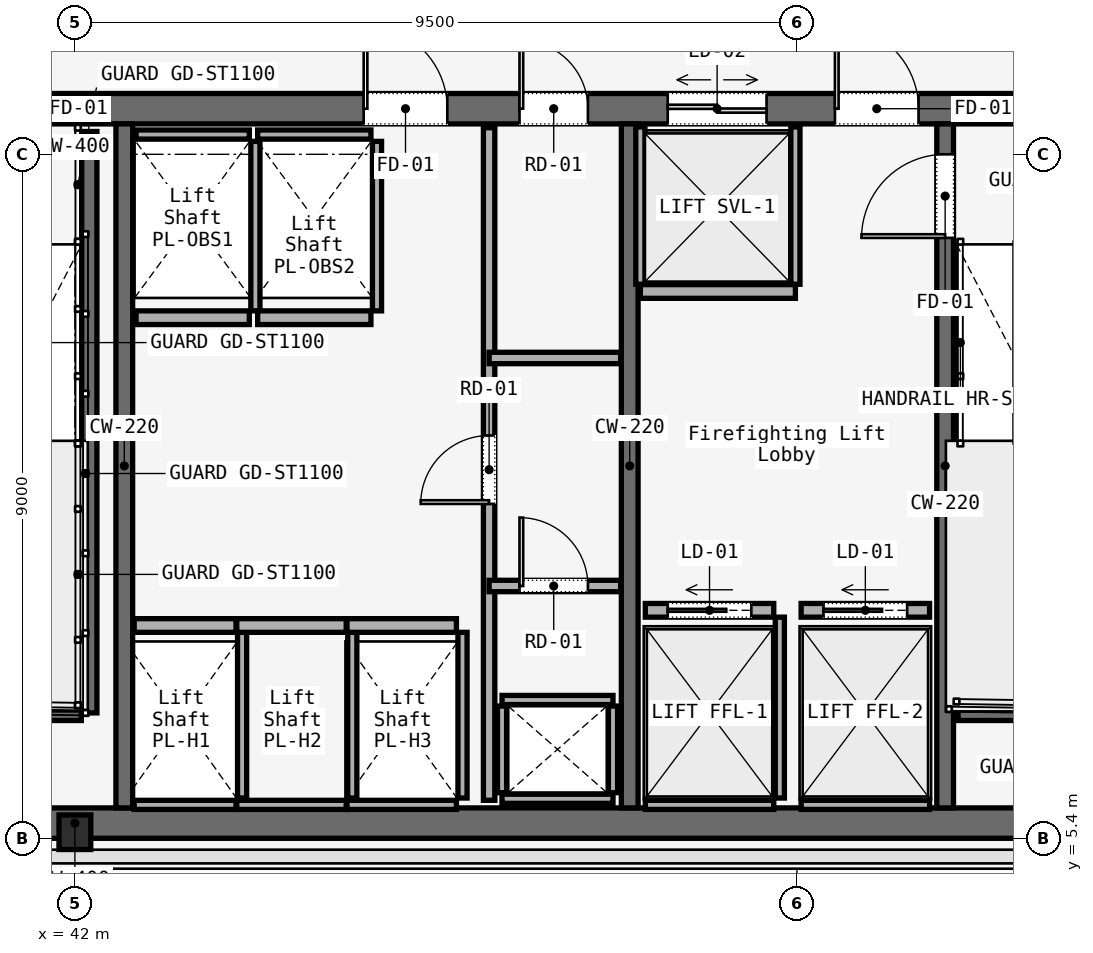
"""IFC4 building model, lengths in metres.
Left out: names, types, materials, properties, quantities, classifications, styles, units other than length and angle.
Written with IfcOpenShell. Run it as: python <this file> out.ifc"""

import sys

from ifc_helpers import new_model, si_unit, direction, frame, frame_2d, origin, origin_2d, place, context, subcontext, project, spatial, rectangle, i_section, extrude, element, fill, save


model = new_model("IFC4")
c1 = context("Model", 3, precision=1e-05, world=origin(), true_north=direction((0.0, 1.0)))
c2 = subcontext(c1, "Body", "Model", "MODEL_VIEW")
j1 = project(units=[si_unit("LENGTHUNIT", "METRE"), si_unit("PLANEANGLEUNIT", "RADIAN")], contexts=[c1])
p1 = place(None, origin())
s1 = spatial("IfcSite", under=j1, at=p1, CompositionType="ELEMENT")
p2 = place(p1, origin())
s2 = spatial("IfcBuilding", under=s1, at=p2, CompositionType="ELEMENT")
p3 = place(p2, frame((0.0, 0.0, 165.0)))
s3 = spatial("IfcBuildingStorey", under=s2, at=p3, CompositionType="ELEMENT", Elevation=165.0)
p4 = place(p3, frame((26.45, 15.0, 0.0), z_axis=(0.0, 0.0, 1.0), x_axis=(1.0, 0.0, 0.0)))
e1 = element("IfcWall", 1, at=p4, inside=s3, PredefinedType="SOLIDWALL", context=c2, shape_type="SweptSolid", body=[
    extrude(rectangle(XDim=31.1, YDim=0.4, at=frame_2d((15.55, 0.0))), origin(), (0.0, 0.0, 1.0), 3.58),
])
p5 = place(p4, frame((1.65, 0.0, 0.0)))
e2 = element("IfcOpeningElement", 2, at=p5, cuts=e1, PredefinedType="OPENING", context=c2, shape_type="SweptSolid", body=[
    extrude(rectangle(XDim=1.1, YDim=2.2, at=frame_2d((0.55, 1.1))), frame((0.0, 0.2, 0.0), z_axis=(0.0, -1.0, 0.0), x_axis=(1.0, 0.0, 0.0)), (0.0, 0.0, 1.0), 0.4),
])
p6 = place(p4, frame((13.65, 0.0, 0.0)))
e3 = element("IfcOpeningElement", 3, at=p6, cuts=e1, PredefinedType="OPENING", context=c2, shape_type="SweptSolid", body=[
    extrude(rectangle(XDim=1.1, YDim=2.2, at=frame_2d((0.55, 1.1))), frame((0.0, 0.2, 0.0), z_axis=(0.0, -1.0, 0.0), x_axis=(1.0, 0.0, 0.0)), (0.0, 0.0, 1.0), 0.4),
])
p7 = place(p4, frame((25.55, 0.0, 0.0)))
e4 = element("IfcOpeningElement", 4, at=p7, cuts=e1, PredefinedType="OPENING", context=c2, shape_type="SweptSolid", body=[
    extrude(rectangle(XDim=1.1, YDim=2.2, at=frame_2d((0.55, 1.1))), frame((0.0, 0.2, 0.0), z_axis=(0.0, -1.0, 0.0), x_axis=(1.0, 0.0, 0.0)), (0.0, 0.0, 1.0), 0.4),
])
p8 = place(p4, frame((10.7, 0.0, 0.0)))
e5 = element("IfcOpeningElement", 5, at=p8, cuts=e1, PredefinedType="OPENING", context=c2, shape_type="SweptSolid", body=[
    extrude(rectangle(XDim=1.4, YDim=2.2, at=frame_2d((0.7, 1.1))), frame((0.0, 0.2, 0.0), z_axis=(0.0, -1.0, 0.0), x_axis=(1.0, 0.0, 0.0)), (0.0, 0.0, 1.0), 0.4),
])
p9 = place(p4, frame((19.35, 0.0, 0.0)))
e6 = element("IfcOpeningElement", 6, at=p9, cuts=e1, PredefinedType="OPENING", context=c2, shape_type="SweptSolid", body=[
    extrude(rectangle(XDim=1.1, YDim=2.2, at=frame_2d((0.55, 1.1))), frame((0.0, 0.2, 0.0), z_axis=(0.0, -1.0, 0.0), x_axis=(1.0, 0.0, 0.0)), (0.0, 0.0, 1.0), 0.4),
])
p10 = place(p4, frame((21.4, 0.0, 0.0)))
e7 = element("IfcOpeningElement", 7, at=p10, cuts=e1, PredefinedType="OPENING", context=c2, shape_type="SweptSolid", body=[
    extrude(rectangle(XDim=0.9, YDim=2.1, at=frame_2d((0.45, 1.05))), frame((0.0, 0.2, 0.0), z_axis=(0.0, -1.0, 0.0), x_axis=(1.0, 0.0, 0.0)), (0.0, 0.0, 1.0), 0.4),
])
p11 = place(p4, frame((23.35, 0.0, 0.0)))
e8 = element("IfcOpeningElement", 8, at=p11, cuts=e1, PredefinedType="OPENING", context=c2, shape_type="SweptSolid", body=[
    extrude(rectangle(XDim=1.3, YDim=2.3, at=frame_2d((0.65, 1.15))), frame((0.0, 0.2, 0.0), z_axis=(0.0, -1.0, 0.0), x_axis=(1.0, 0.0, 0.0)), (0.0, 0.0, 1.0), 0.4),
])
p12 = place(p3, frame((26.45, 5.6, 0.0), z_axis=(0.0, 0.0, 1.0), x_axis=(1.0, 0.0, 0.0)))
e9 = element("IfcWall", 9, at=p12, inside=s3, PredefinedType="SOLIDWALL", context=c2, shape_type="SweptSolid", body=[
    extrude(rectangle(XDim=31.1, YDim=0.4, at=frame_2d((15.55, 0.0))), origin(), (0.0, 0.0, 1.0), 3.58),
])
for number, where, z_axis, x_axis in (
    (10, (42.65, 5.8, 0.0), (0.0, 0.0, 1.0), (0.0, 1.0, 0.0)),
    (11, (49.3, 5.8, 0.0), (0.0, 0.0, 1.0), (0.0, 1.0, 0.0)),
):
    element("IfcWall", number, at=place(p3, frame(where, z_axis=z_axis, x_axis=x_axis)), inside=s3, PredefinedType="SOLIDWALL", context=c2, shape_type="SweptSolid", body=[
        extrude(rectangle(XDim=9.0, YDim=0.22, at=frame_2d((4.5, 0.0))), origin(), (0.0, 0.0, 1.0), 3.58),
    ])
p13 = place(p3, frame((53.45, 5.8, 0.0), z_axis=(0.0, 0.0, 1.0), x_axis=(0.0, 1.0, 0.0)))
e12 = element("IfcWall", 12, at=p13, inside=s3, PredefinedType="SOLIDWALL", context=c2, shape_type="SweptSolid", body=[
    extrude(rectangle(XDim=9.0, YDim=0.22, at=frame_2d((4.5, 0.0))), origin(), (0.0, 0.0, 1.0), 3.58),
])
p14 = place(p13, frame((7.5, 0.0, 0.0)))
e13 = element("IfcOpeningElement", 13, at=p14, cuts=e12, PredefinedType="OPENING", context=c2, shape_type="SweptSolid", body=[
    extrude(rectangle(XDim=1.1, YDim=2.2, at=frame_2d((0.55, 1.1))), frame((0.0, 0.11, 0.0), z_axis=(0.0, -1.0, 0.0), x_axis=(1.0, 0.0, 0.0)), (0.0, 0.0, 1.0), 0.22),
])
p15 = place(p3, frame((42.0, 5.48, 0.0), z_axis=(0.0, 0.0, 1.0), x_axis=(1.0, 0.0, 0.0)))
e14 = element("IfcColumn", 14, at=p15, inside=s3, PredefinedType="COLUMN", context=c2, shape_type="SweptSolid", body=[
    extrude(i_section(OverallWidth=0.418, OverallDepth=0.455, WebThickness=0.042, FlangeThickness=0.052, FilletRadius=0.015, at=origin_2d()), origin(), (0.0, 0.0, 1.0), 3.58),
])
p16 = place(p3, frame((42.19, 14.7, 0.0), z_axis=(0.0, 0.0, 1.0), x_axis=(0.0, -1.0, 0.0)))
e15 = element("IfcWall", 15, at=p16, inside=s3, PredefinedType="SOLIDWALL", context=c2, shape_type="SweptSolid", body=[
    extrude(rectangle(XDim=7.65, YDim=0.2, at=frame_2d((3.825, 0.0))), origin(), (0.0, 0.0, 1.0), 3.8),
])
for number, where, z_axis, x_axis in (
    (16, (38.97, 7.05, 0.0), (0.0, 0.0, 1.0), (1.0, 0.0, 0.0)),
    (17, (53.62, 7.05, 0.0), (0.0, 0.0, 1.0), (1.0, 0.0, 0.0)),
):
    element("IfcWall", number, at=place(p3, frame(where, z_axis=z_axis, x_axis=x_axis)), inside=s3, PredefinedType="SOLIDWALL", context=c2, shape_type="SweptSolid", body=[
        extrude(rectangle(XDim=3.115, YDim=0.2, at=frame_2d((1.558, 0.0))), origin(), (0.0, 0.0, 1.0), 3.8),
    ])
for number, where, z_axis, x_axis in (
    (18, (47.62, 5.92, 0.0), (0.0, 0.0, 1.0), (1.0, 0.0, 0.0)),
    (19, (47.62, 7.22, 0.0), (0.0, 0.0, 1.0), (1.0, 0.0, 0.0)),
):
    element("IfcWall", number, at=place(p3, frame(where, z_axis=z_axis, x_axis=x_axis)), inside=s3, PredefinedType="SOLIDWALL", context=c2, shape_type="SweptSolid", body=[
        extrude(rectangle(XDim=1.46, YDim=0.12, at=frame_2d((0.73, 0.0))), origin(), (0.0, 0.0, 1.0), 3.01),
    ])
for number, where, z_axis, x_axis in (
    (20, (47.62, 6.0, 0.0), (0.0, 0.0, 1.0), (0.0, 1.0, 0.0)),
    (21, (49.08, 6.0, 0.0), (0.0, 0.0, 1.0), (0.0, 1.0, 0.0)),
):
    element("IfcWall", number, at=place(p3, frame(where, z_axis=z_axis, x_axis=x_axis)), inside=s3, PredefinedType="SOLIDWALL", context=c2, shape_type="SweptSolid", body=[
        extrude(rectangle(XDim=1.14, YDim=0.12, at=frame_2d((0.57, 0.0))), origin(), (0.0, 0.0, 1.0), 3.01),
    ])
p17 = place(p3, frame((47.45, 5.9, 0.0), z_axis=(0.0, 0.0, 1.0), x_axis=(0.0, 1.0, 0.0)))
e22 = element("IfcWall", 22, at=p17, inside=s3, PredefinedType="PARTITIONING", context=c2, shape_type="SweptSolid", body=[
    extrude(rectangle(XDim=8.85, YDim=0.15, at=frame_2d((4.425, 0.0))), origin(), (0.0, 0.0, 1.0), 3.01),
])
p18 = place(p17, frame((3.9, 0.0, 0.0)))
e23 = element("IfcOpeningElement", 23, at=p18, cuts=e22, PredefinedType="OPENING", context=c2, shape_type="SweptSolid", body=[
    extrude(rectangle(XDim=0.9, YDim=2.1, at=frame_2d((0.45, 1.05))), frame((0.0, 0.075, 0.0), z_axis=(0.0, -1.0, 0.0), x_axis=(1.0, 0.0, 0.0)), (0.0, 0.0, 1.0), 0.15),
])
p19 = place(p3, frame((47.45, 8.72, 0.0), z_axis=(0.0, 0.0, 1.0), x_axis=(1.0, 0.0, 0.0)))
e24 = element("IfcWall", 24, at=p19, inside=s3, PredefinedType="PARTITIONING", context=c2, shape_type="SweptSolid", body=[
    extrude(rectangle(XDim=1.73, YDim=0.15, at=frame_2d((0.865, 0.0))), origin(), (0.0, 0.0, 1.0), 3.01),
])
p20 = place(p19, frame((0.4, 0.0, 0.0)))
e25 = element("IfcOpeningElement", 25, at=p20, cuts=e24, PredefinedType="OPENING", context=c2, shape_type="SweptSolid", body=[
    extrude(rectangle(XDim=0.9, YDim=2.1, at=frame_2d((0.45, 1.05))), frame((0.0, 0.075, 0.0), z_axis=(0.0, -1.0, 0.0), x_axis=(1.0, 0.0, 0.0)), (0.0, 0.0, 1.0), 0.15),
])
p21 = place(p3, frame((47.45, 11.72, 0.0), z_axis=(0.0, 0.0, 1.0), x_axis=(1.0, 0.0, 0.0)))
e26 = element("IfcWall", 26, at=p21, inside=s3, PredefinedType="PARTITIONING", context=c2, shape_type="SweptSolid", body=[
    extrude(rectangle(XDim=1.73, YDim=0.15, at=frame_2d((0.865, 0.0))), origin(), (0.0, 0.0, 1.0), 3.01),
])
p22 = place(p3, frame((42.78, 8.2, 0.0), z_axis=(0.0, 0.0, 1.0), x_axis=(1.0, 0.0, 0.0)))
e27 = element("IfcWall", 27, at=p22, inside=s3, PredefinedType="SOLIDWALL", context=c2, shape_type="SweptSolid", body=[
    extrude(rectangle(XDim=1.34, YDim=0.18, at=frame_2d((0.67, 0.0))), origin(), (0.0, 0.0, 1.0), 3.01),
])
p23 = place(p3, frame((42.78, 5.84, 0.0), z_axis=(0.0, 0.0, 1.0), x_axis=(1.0, 0.0, 0.0)))
e28 = element("IfcWall", 28, at=p23, inside=s3, PredefinedType="SOLIDWALL", context=c2, shape_type="SweptSolid", body=[
    extrude(rectangle(XDim=1.34, YDim=0.12, at=frame_2d((0.67, 0.0))), origin(), (0.0, 0.0, 1.0), 3.01),
])
p24 = place(p3, frame((44.2, 5.93, 0.0), z_axis=(0.0, 0.0, 1.0), x_axis=(0.0, 1.0, 0.0)))
e29 = element("IfcWall", 29, at=p24, inside=s3, PredefinedType="SOLIDWALL", context=c2, shape_type="SweptSolid", body=[
    extrude(rectangle(XDim=2.18, YDim=0.12, at=frame_2d((1.09, 0.0))), origin(), (0.0, 0.0, 1.0), 3.01),
])
p25 = place(p3, frame((44.13, 8.2, 0.0), z_axis=(0.0, 0.0, 1.0), x_axis=(1.0, 0.0, 0.0)))
e30 = element("IfcWall", 30, at=p25, inside=s3, PredefinedType="SOLIDWALL", context=c2, shape_type="SweptSolid", body=[
    extrude(rectangle(XDim=1.44, YDim=0.18, at=frame_2d((0.72, 0.0))), origin(), (0.0, 0.0, 1.0), 3.01),
])
p26 = place(p3, frame((44.13, 5.84, 0.0), z_axis=(0.0, 0.0, 1.0), x_axis=(1.0, 0.0, 0.0)))
e31 = element("IfcWall", 31, at=p26, inside=s3, PredefinedType="SOLIDWALL", context=c2, shape_type="SweptSolid", body=[
    extrude(rectangle(XDim=1.44, YDim=0.12, at=frame_2d((0.72, 0.0))), origin(), (0.0, 0.0, 1.0), 3.01),
])
p27 = place(p3, frame((45.65, 5.93, 0.0), z_axis=(0.0, 0.0, 1.0), x_axis=(0.0, 1.0, 0.0)))
e32 = element("IfcWall", 32, at=p27, inside=s3, PredefinedType="SOLIDWALL", context=c2, shape_type="SweptSolid", body=[
    extrude(rectangle(XDim=2.18, YDim=0.12, at=frame_2d((1.09, 0.0))), origin(), (0.0, 0.0, 1.0), 3.01),
])
p28 = place(p3, frame((45.58, 8.2, 0.0), z_axis=(0.0, 0.0, 1.0), x_axis=(1.0, 0.0, 0.0)))
e33 = element("IfcWall", 33, at=p28, inside=s3, PredefinedType="SOLIDWALL", context=c2, shape_type="SweptSolid", body=[
    extrude(rectangle(XDim=1.44, YDim=0.18, at=frame_2d((0.72, 0.0))), origin(), (0.0, 0.0, 1.0), 3.01),
])
p29 = place(p3, frame((45.58, 5.84, 0.0), z_axis=(0.0, 0.0, 1.0), x_axis=(1.0, 0.0, 0.0)))
e34 = element("IfcWall", 34, at=p29, inside=s3, PredefinedType="SOLIDWALL", context=c2, shape_type="SweptSolid", body=[
    extrude(rectangle(XDim=1.44, YDim=0.12, at=frame_2d((0.72, 0.0))), origin(), (0.0, 0.0, 1.0), 3.01),
])
p30 = place(p3, frame((47.1, 5.93, 0.0), z_axis=(0.0, 0.0, 1.0), x_axis=(0.0, 1.0, 0.0)))
e35 = element("IfcWall", 35, at=p30, inside=s3, PredefinedType="SOLIDWALL", context=c2, shape_type="SweptSolid", body=[
    extrude(rectangle(XDim=2.18, YDim=0.12, at=frame_2d((1.09, 0.0))), origin(), (0.0, 0.0, 1.0), 3.01),
])
p31 = place(p3, frame((42.805, 12.25, 0.0), z_axis=(0.0, 0.0, 1.0), x_axis=(1.0, 0.0, 0.0)))
e36 = element("IfcWall", 36, at=p31, inside=s3, PredefinedType="SOLIDWALL", context=c2, shape_type="SweptSolid", body=[
    extrude(rectangle(XDim=1.49, YDim=0.18, at=frame_2d((0.745, 0.0))), origin(), (0.0, 0.0, 1.0), 3.01),
])
p32 = place(p3, frame((42.805, 14.66, 0.0), z_axis=(0.0, 0.0, 1.0), x_axis=(1.0, 0.0, 0.0)))
e37 = element("IfcWall", 37, at=p32, inside=s3, PredefinedType="SOLIDWALL", context=c2, shape_type="SweptSolid", body=[
    extrude(rectangle(XDim=1.49, YDim=0.12, at=frame_2d((0.745, 0.0))), origin(), (0.0, 0.0, 1.0), 3.01),
])
p33 = place(p3, frame((44.375, 12.34, 0.0), z_axis=(0.0, 0.0, 1.0), x_axis=(0.0, 1.0, 0.0)))
e38 = element("IfcWall", 38, at=p33, inside=s3, PredefinedType="SOLIDWALL", context=c2, shape_type="SweptSolid", body=[
    extrude(rectangle(XDim=2.23, YDim=0.12, at=frame_2d((1.115, 0.0))), origin(), (0.0, 0.0, 1.0), 3.01),
])
p34 = place(p3, frame((44.405, 12.25, 0.0), z_axis=(0.0, 0.0, 1.0), x_axis=(1.0, 0.0, 0.0)))
e39 = element("IfcWall", 39, at=p34, inside=s3, PredefinedType="SOLIDWALL", context=c2, shape_type="SweptSolid", body=[
    extrude(rectangle(XDim=1.49, YDim=0.18, at=frame_2d((0.745, 0.0))), origin(), (0.0, 0.0, 1.0), 3.01),
])
p35 = place(p3, frame((44.405, 14.66, 0.0), z_axis=(0.0, 0.0, 1.0), x_axis=(1.0, 0.0, 0.0)))
e40 = element("IfcWall", 40, at=p35, inside=s3, PredefinedType="SOLIDWALL", context=c2, shape_type="SweptSolid", body=[
    extrude(rectangle(XDim=1.49, YDim=0.12, at=frame_2d((0.745, 0.0))), origin(), (0.0, 0.0, 1.0), 3.01),
])
p36 = place(p3, frame((45.975, 12.34, 0.0), z_axis=(0.0, 0.0, 1.0), x_axis=(0.0, 1.0, 0.0)))
e41 = element("IfcWall", 41, at=p36, inside=s3, PredefinedType="SOLIDWALL", context=c2, shape_type="SweptSolid", body=[
    extrude(rectangle(XDim=2.23, YDim=0.12, at=frame_2d((1.115, 0.0))), origin(), (0.0, 0.0, 1.0), 3.01),
])
p37 = place(p3, frame((49.505, 8.4, 0.0), z_axis=(0.0, 0.0, 1.0), x_axis=(1.0, 0.0, 0.0)))
e42 = element("IfcWall", 42, at=p37, inside=s3, PredefinedType="SOLIDWALL", context=c2, shape_type="SweptSolid", body=[
    extrude(rectangle(XDim=1.69, YDim=0.18, at=frame_2d((0.845, 0.0))), origin(), (0.0, 0.0, 1.0), 3.01),
])
p38 = place(p37, frame((0.295, 0.0, 0.0)))
e43 = element("IfcOpeningElement", 43, at=p38, cuts=e42, PredefinedType="OPENING", context=c2, shape_type="SweptSolid", body=[
    extrude(rectangle(XDim=1.1, YDim=2.2, at=frame_2d((0.55, 1.1))), frame((0.0, 0.09, 0.0), z_axis=(0.0, -1.0, 0.0), x_axis=(1.0, 0.0, 0.0)), (0.0, 0.0, 1.0), 0.18),
])
p39 = place(p3, frame((49.505, 5.84, 0.0), z_axis=(0.0, 0.0, 1.0), x_axis=(1.0, 0.0, 0.0)))
e44 = element("IfcWall", 44, at=p39, inside=s3, PredefinedType="SOLIDWALL", context=c2, shape_type="SweptSolid", body=[
    extrude(rectangle(XDim=1.69, YDim=0.12, at=frame_2d((0.845, 0.0))), origin(), (0.0, 0.0, 1.0), 3.01),
])
p40 = place(p3, frame((51.275, 5.93, 0.0), z_axis=(0.0, 0.0, 1.0), x_axis=(0.0, 1.0, 0.0)))
e45 = element("IfcWall", 45, at=p40, inside=s3, PredefinedType="SOLIDWALL", context=c2, shape_type="SweptSolid", body=[
    extrude(rectangle(XDim=2.38, YDim=0.12, at=frame_2d((1.19, 0.0))), origin(), (0.0, 0.0, 1.0), 3.01),
])
p41 = place(p3, frame((51.555, 8.4, 0.0), z_axis=(0.0, 0.0, 1.0), x_axis=(1.0, 0.0, 0.0)))
e46 = element("IfcWall", 46, at=p41, inside=s3, PredefinedType="SOLIDWALL", context=c2, shape_type="SweptSolid", body=[
    extrude(rectangle(XDim=1.69, YDim=0.18, at=frame_2d((0.845, 0.0))), origin(), (0.0, 0.0, 1.0), 3.01),
])
p42 = place(p41, frame((0.295, 0.0, 0.0)))
e47 = element("IfcOpeningElement", 47, at=p42, cuts=e46, PredefinedType="OPENING", context=c2, shape_type="SweptSolid", body=[
    extrude(rectangle(XDim=1.1, YDim=2.2, at=frame_2d((0.55, 1.1))), frame((0.0, 0.09, 0.0), z_axis=(0.0, -1.0, 0.0), x_axis=(1.0, 0.0, 0.0)), (0.0, 0.0, 1.0), 0.18),
])
p43 = place(p3, frame((51.555, 5.84, 0.0), z_axis=(0.0, 0.0, 1.0), x_axis=(1.0, 0.0, 0.0)))
e48 = element("IfcWall", 48, at=p43, inside=s3, PredefinedType="SOLIDWALL", context=c2, shape_type="SweptSolid", body=[
    extrude(rectangle(XDim=1.69, YDim=0.12, at=frame_2d((0.845, 0.0))), origin(), (0.0, 0.0, 1.0), 3.01),
])
p44 = place(p3, frame((49.44, 12.595, 0.0), z_axis=(0.0, 0.0, 1.0), x_axis=(1.0, 0.0, 0.0)))
e49 = element("IfcWall", 49, at=p44, inside=s3, PredefinedType="SOLIDWALL", context=c2, shape_type="SweptSolid", body=[
    extrude(rectangle(XDim=2.04, YDim=0.18, at=frame_2d((1.02, 0.0))), origin(), (0.0, 0.0, 1.0), 3.01),
])
for number, where, z_axis, x_axis in (
    (50, (49.44, 12.69, 0.0), (0.0, 0.0, 1.0), (0.0, 1.0, 0.0)),
    (51, (51.48, 12.69, 0.0), (0.0, 0.0, 1.0), (0.0, 1.0, 0.0)),
):
    element("IfcWall", number, at=place(p3, frame(where, z_axis=z_axis, x_axis=x_axis)), inside=s3, PredefinedType="SOLIDWALL", context=c2, shape_type="SweptSolid", body=[
        extrude(rectangle(XDim=2.07, YDim=0.12, at=frame_2d((1.035, 0.0))), origin(), (0.0, 0.0, 1.0), 3.01),
    ])
p45 = place(p7, origin())
e52 = element("IfcDoor", 52, at=p45, inside=s3, OperationType="SINGLE_SWING_RIGHT", PredefinedType="DOOR", context=c2, shape_type="SweptSolid", body=[
    extrude(rectangle(XDim=1.1, YDim=2.2, at=frame_2d((0.55, 1.1))), frame((0.0, 0.025, 0.0), z_axis=(0.0, -1.0, 0.0), x_axis=(1.0, 0.0, 0.0)), (0.0, 0.0, 1.0), 0.05),
])
fill(e4, e52)
p46 = place(p9, origin())
e53 = element("IfcDoor", 53, at=p46, inside=s3, OperationType="SINGLE_SWING_LEFT", PredefinedType="DOOR", context=c2, shape_type="SweptSolid", body=[
    extrude(rectangle(XDim=1.1, YDim=2.2, at=frame_2d((0.55, 1.1))), frame((0.0, 0.025, 0.0), z_axis=(0.0, -1.0, 0.0), x_axis=(1.0, 0.0, 0.0)), (0.0, 0.0, 1.0), 0.05),
])
fill(e6, e53)
p47 = place(p10, origin())
e54 = element("IfcDoor", 54, at=p47, inside=s3, OperationType="SINGLE_SWING_LEFT", PredefinedType="DOOR", context=c2, shape_type="SweptSolid", body=[
    extrude(rectangle(XDim=0.9, YDim=2.1, at=frame_2d((0.45, 1.05))), frame((0.0, 0.025, 0.0), z_axis=(0.0, -1.0, 0.0), x_axis=(1.0, 0.0, 0.0)), (0.0, 0.0, 1.0), 0.05),
])
fill(e7, e54)
p48 = place(p14, origin())
e55 = element("IfcDoor", 55, at=p48, inside=s3, OperationType="SINGLE_SWING_LEFT", PredefinedType="DOOR", context=c2, shape_type="SweptSolid", body=[
    extrude(rectangle(XDim=1.1, YDim=2.2, at=frame_2d((0.55, 1.1))), frame((0.0, 0.025, 0.0), z_axis=(0.0, -1.0, 0.0), x_axis=(1.0, 0.0, 0.0)), (0.0, 0.0, 1.0), 0.05),
])
fill(e13, e55)
p49 = place(p18, origin())
e56 = element("IfcDoor", 56, at=p49, inside=s3, OperationType="SINGLE_SWING_LEFT", PredefinedType="DOOR", context=c2, shape_type="SweptSolid", body=[
    extrude(rectangle(XDim=0.9, YDim=2.1, at=frame_2d((0.45, 1.05))), frame((0.0, 0.025, 0.0), z_axis=(0.0, -1.0, 0.0), x_axis=(1.0, 0.0, 0.0)), (0.0, 0.0, 1.0), 0.05),
])
fill(e23, e56)
p50 = place(p20, origin())
e57 = element("IfcDoor", 57, at=p50, inside=s3, OperationType="SINGLE_SWING_RIGHT", PredefinedType="DOOR", context=c2, shape_type="SweptSolid", body=[
    extrude(rectangle(XDim=0.9, YDim=2.1, at=frame_2d((0.45, 1.05))), frame((0.0, 0.025, 0.0), z_axis=(0.0, -1.0, 0.0), x_axis=(1.0, 0.0, 0.0)), (0.0, 0.0, 1.0), 0.05),
])
fill(e25, e57)
p51 = place(p38, origin())
e58 = element("IfcDoor", 58, at=p51, inside=s3, OperationType="SLIDING_TO_LEFT", PredefinedType="DOOR", context=c2, shape_type="SweptSolid", body=[
    extrude(rectangle(XDim=1.1, YDim=2.2, at=frame_2d((0.55, 1.1))), frame((0.0, 0.025, 0.0), z_axis=(0.0, -1.0, 0.0), x_axis=(1.0, 0.0, 0.0)), (0.0, 0.0, 1.0), 0.05),
])
fill(e43, e58)
p52 = place(p42, origin())
e59 = element("IfcDoor", 59, at=p52, inside=s3, OperationType="SLIDING_TO_LEFT", PredefinedType="DOOR", context=c2, shape_type="SweptSolid", body=[
    extrude(rectangle(XDim=1.1, YDim=2.2, at=frame_2d((0.55, 1.1))), frame((0.0, 0.025, 0.0), z_axis=(0.0, -1.0, 0.0), x_axis=(1.0, 0.0, 0.0)), (0.0, 0.0, 1.0), 0.05),
])
fill(e47, e59)
p53 = place(p11, origin())
e60 = element("IfcDoor", 60, at=p53, inside=s3, OperationType="DOUBLE_DOOR_SLIDING", PredefinedType="DOOR", context=c2, shape_type="SweptSolid", body=[
    extrude(rectangle(XDim=1.3, YDim=2.3, at=frame_2d((0.65, 1.15))), frame((0.0, 0.025, 0.0), z_axis=(0.0, -1.0, 0.0), x_axis=(1.0, 0.0, 0.0)), (0.0, 0.0, 1.0), 0.05),
])
fill(e8, e60)
save(model, sys.argv[1])
